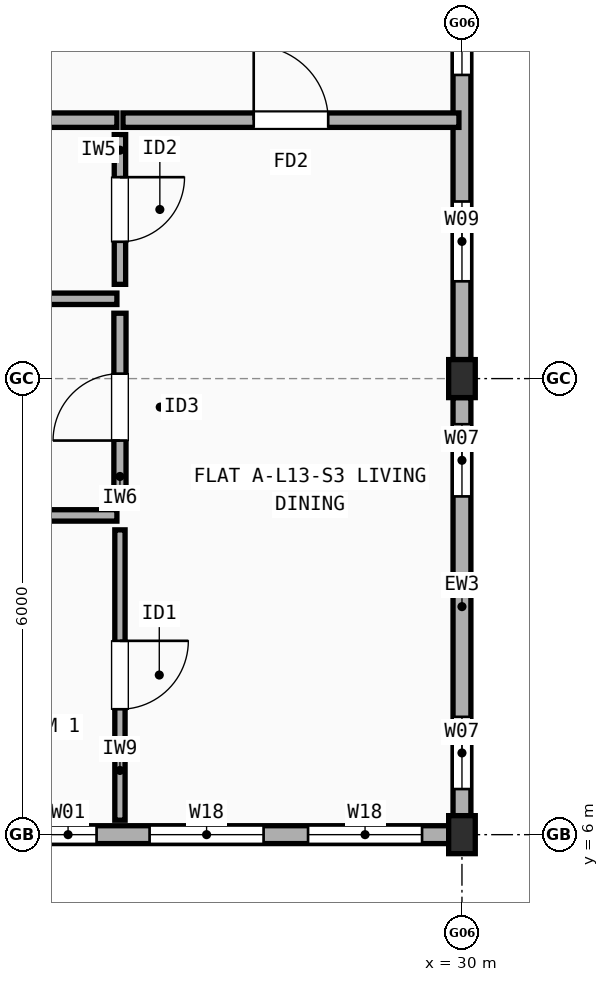
"""IFC4 building model, lengths in metres.
Left out: names, types, materials, properties, quantities, classifications, styles, units other than length and angle.
Written with IfcOpenShell. Run it as: python <this file> out.ifc"""

import sys

from ifc_helpers import new_model, si_unit, direction, frame, frame_2d, origin, origin_2d, place, context, subcontext, project, spatial, rectangle, extrude, element, fill, save


model = new_model("IFC4")
c1 = context("Model", 3, precision=1e-05, world=origin(), true_north=direction((0.0, 1.0)))
c2 = subcontext(c1, "Body", "Model", "MODEL_VIEW")
j1 = project(units=[si_unit("LENGTHUNIT", "METRE"), si_unit("PLANEANGLEUNIT", "RADIAN")], contexts=[c1])
p1 = place(None, origin())
s1 = spatial("IfcSite", under=j1, at=p1, CompositionType="ELEMENT")
p2 = place(p1, origin())
s2 = spatial("IfcBuilding", under=s1, at=p2, CompositionType="ELEMENT")
p3 = place(p2, frame((0.0, 0.0, 42.9)))
s3 = spatial("IfcBuildingStorey", under=s2, at=p3, CompositionType="ELEMENT", Elevation=42.9)
for number, where, z_axis, x_axis in (
    (1, (30.0, 6.0, 0.0), (0.0, 0.0, 1.0), (1.0, 0.0, 0.0)),
    (2, (30.0, 12.0, 0.0), (0.0, 0.0, 1.0), (1.0, 0.0, 0.0)),
):
    element("IfcColumn", number, at=place(p3, frame(where, z_axis=z_axis, x_axis=x_axis)), inside=s3, PredefinedType="COLUMN", context=c2, shape_type="SweptSolid", body=[
        extrude(rectangle(XDim=0.35, YDim=0.5, at=origin_2d()), origin(), (0.0, 0.0, 1.0), 3.005),
    ])
p4 = place(p3, frame((24.175, 6.0, 0.0), z_axis=(0.0, 0.0, 1.0), x_axis=(1.0, 0.0, 0.0)))
e3 = element("IfcWall", 3, at=p4, inside=s3, PredefinedType="STANDARD", context=c2, shape_type="SweptSolid", body=[
    extrude(rectangle(XDim=5.65, YDim=0.235, at=frame_2d((2.825, 0.0))), origin(), (0.0, 0.0, 1.0), 2.487),
])
p5 = place(p4, frame((0.268, 0.0, 0.9)))
e4 = element("IfcOpeningElement", 4, at=p5, cuts=e3, PredefinedType="OPENING", context=c2, shape_type="SweptSolid", body=[
    extrude(rectangle(XDim=0.75, YDim=1.15, at=frame_2d((0.375, 0.575))), frame((0.0, 0.127, 0.0), z_axis=(0.0, -1.0, 0.0), x_axis=(1.0, 0.0, 0.0)), (0.0, 0.0, 1.0), 0.255),
])
p6 = place(p4, frame((1.715, 0.0, 0.9)))
e5 = element("IfcOpeningElement", 5, at=p6, cuts=e3, PredefinedType="OPENING", context=c2, shape_type="SweptSolid", body=[
    extrude(rectangle(XDim=1.5, YDim=1.4, at=frame_2d((0.75, 0.7))), frame((0.0, 0.127, 0.0), z_axis=(0.0, -1.0, 0.0), x_axis=(1.0, 0.0, 0.0)), (0.0, 0.0, 1.0), 0.255),
])
p7 = place(p4, frame((3.8, 0.0, 0.9)))
e6 = element("IfcOpeningElement", 6, at=p7, cuts=e3, PredefinedType="OPENING", context=c2, shape_type="SweptSolid", body=[
    extrude(rectangle(XDim=1.5, YDim=1.4, at=frame_2d((0.75, 0.7))), frame((0.0, 0.127, 0.0), z_axis=(0.0, -1.0, 0.0), x_axis=(1.0, 0.0, 0.0)), (0.0, 0.0, 1.0), 0.255),
])
p8 = place(p3, frame((30.0, 6.25, 0.0), z_axis=(0.0, 0.0, 1.0), x_axis=(0.0, 1.0, 0.0)))
e7 = element("IfcWall", 7, at=p8, inside=s3, PredefinedType="STANDARD", context=c2, shape_type="SweptSolid", body=[
    extrude(rectangle(XDim=5.5, YDim=0.235, at=frame_2d((2.75, 0.0))), origin(), (0.0, 0.0, 1.0), 2.487),
])
p9 = place(p8, frame((0.35, 0.0, 0.9)))
e8 = element("IfcOpeningElement", 8, at=p9, cuts=e7, PredefinedType="OPENING", context=c2, shape_type="SweptSolid", body=[
    extrude(rectangle(XDim=0.95, YDim=1.35, at=frame_2d((0.475, 0.675))), frame((0.0, 0.127, 0.0), z_axis=(0.0, -1.0, 0.0), x_axis=(1.0, 0.0, 0.0)), (0.0, 0.0, 1.0), 0.255),
])
p10 = place(p8, frame((4.2, 0.0, 0.9)))
e9 = element("IfcOpeningElement", 9, at=p10, cuts=e7, PredefinedType="OPENING", context=c2, shape_type="SweptSolid", body=[
    extrude(rectangle(XDim=0.95, YDim=1.35, at=frame_2d((0.475, 0.675))), frame((0.0, 0.127, 0.0), z_axis=(0.0, -1.0, 0.0), x_axis=(1.0, 0.0, 0.0)), (0.0, 0.0, 1.0), 0.255),
])
p11 = place(p3, frame((30.0, 12.25, 0.0), z_axis=(0.0, 0.0, 1.0), x_axis=(0.0, 1.0, 0.0)))
e10 = element("IfcWall", 10, at=p11, inside=s3, PredefinedType="STANDARD", context=c2, shape_type="SweptSolid", body=[
    extrude(rectangle(XDim=5.5, YDim=0.235, at=frame_2d((2.75, 0.0))), origin(), (0.0, 0.0, 1.0), 2.487),
])
p12 = place(p11, frame((1.03, 0.0, 0.9)))
e11 = element("IfcOpeningElement", 11, at=p12, cuts=e10, PredefinedType="OPENING", context=c2, shape_type="SweptSolid", body=[
    extrude(rectangle(XDim=1.05, YDim=1.35, at=frame_2d((0.525, 0.675))), frame((0.0, 0.127, 0.0), z_axis=(0.0, -1.0, 0.0), x_axis=(1.0, 0.0, 0.0)), (0.0, 0.0, 1.0), 0.255),
])
p13 = place(p11, frame((3.745, 0.0, 0.9)))
e12 = element("IfcOpeningElement", 12, at=p13, cuts=e10, PredefinedType="OPENING", context=c2, shape_type="SweptSolid", body=[
    extrude(rectangle(XDim=1.2, YDim=1.35, at=frame_2d((0.6, 0.675))), frame((0.0, 0.127, 0.0), z_axis=(0.0, -1.0, 0.0), x_axis=(1.0, 0.0, 0.0)), (0.0, 0.0, 1.0), 0.255),
])
p14 = place(p3, frame((22.54, 15.4, 0.0), z_axis=(0.0, 0.0, 1.0), x_axis=(1.0, 0.0, 0.0)))
e13 = element("IfcWall", 13, at=p14, inside=s3, PredefinedType="SOLIDWALL", context=c2, shape_type="SweptSolid", body=[
    extrude(rectangle(XDim=2.92, YDim=0.19, at=frame_2d((1.46, 0.0))), origin(), (0.0, 0.0, 1.0), 2.548),
])
p15 = place(p3, frame((25.54, 15.4, 0.0), z_axis=(0.0, 0.0, 1.0), x_axis=(1.0, 0.0, 0.0)))
e14 = element("IfcWall", 14, at=p15, inside=s3, PredefinedType="SOLIDWALL", context=c2, shape_type="SweptSolid", body=[
    extrude(rectangle(XDim=4.42, YDim=0.19, at=frame_2d((2.21, 0.0))), origin(), (0.0, 0.0, 1.0), 2.487),
])
p16 = place(p15, frame((1.72, 0.0, 0.0)))
e15 = element("IfcOpeningElement", 15, at=p16, cuts=e14, PredefinedType="OPENING", context=c2, shape_type="SweptSolid", body=[
    extrude(rectangle(XDim=0.98, YDim=2.15, at=frame_2d((0.49, 1.075))), frame((0.0, 0.105, 0.0), z_axis=(0.0, -1.0, 0.0), x_axis=(1.0, 0.0, 0.0)), (0.0, 0.0, 1.0), 0.21),
])
p17 = place(p3, frame((25.5, 6.19, 0.0), z_axis=(0.0, 0.0, 1.0), x_axis=(0.0, 1.0, 0.0)))
e16 = element("IfcWall", 16, at=p17, inside=s3, PredefinedType="PARTITIONING", context=c2, shape_type="SweptSolid", body=[
    extrude(rectangle(XDim=3.82, YDim=0.135, at=frame_2d((1.91, 0.0))), origin(), (0.0, 0.0, 1.0), 3.005),
])
p18 = place(p17, frame((1.46, 0.0, 0.0)))
e17 = element("IfcOpeningElement", 17, at=p18, cuts=e16, PredefinedType="OPENING", context=c2, shape_type="SweptSolid", body=[
    extrude(rectangle(XDim=0.9, YDim=2.1, at=frame_2d((0.45, 1.05))), frame((0.0, 0.077, 0.0), z_axis=(0.0, -1.0, 0.0), x_axis=(1.0, 0.0, 0.0)), (0.0, 0.0, 1.0), 0.155),
])
p19 = place(p3, frame((25.5, 10.39, 0.0), z_axis=(0.0, 0.0, 1.0), x_axis=(0.0, 1.0, 0.0)))
e18 = element("IfcWall", 18, at=p19, inside=s3, PredefinedType="PLUMBINGWALL", context=c2, shape_type="SweptSolid", body=[
    extrude(rectangle(XDim=2.47, YDim=0.16, at=frame_2d((1.235, 0.0))), origin(), (0.0, 0.0, 1.0), 2.537),
])
p20 = place(p19, frame((0.795, 0.0, 0.0)))
e19 = element("IfcOpeningElement", 19, at=p20, cuts=e18, PredefinedType="OPENING", context=c2, shape_type="SweptSolid", body=[
    extrude(rectangle(XDim=0.88, YDim=2.1, at=frame_2d((0.44, 1.05))), frame((0.0, 0.09, 0.0), z_axis=(0.0, -1.0, 0.0), x_axis=(1.0, 0.0, 0.0)), (0.0, 0.0, 1.0), 0.18),
])
p21 = place(p3, frame((25.5, 13.24, 0.0), z_axis=(0.0, 0.0, 1.0), x_axis=(0.0, 1.0, 0.0)))
e20 = element("IfcWall", 20, at=p21, inside=s3, PredefinedType="PARTITIONING", context=c2, shape_type="SweptSolid", body=[
    extrude(rectangle(XDim=1.97, YDim=0.15, at=frame_2d((0.985, 0.0))), origin(), (0.0, 0.0, 1.0), 3.005),
])
p22 = place(p21, frame((0.56, 0.0, 0.0)))
e21 = element("IfcOpeningElement", 21, at=p22, cuts=e20, PredefinedType="OPENING", context=c2, shape_type="SweptSolid", body=[
    extrude(rectangle(XDim=0.85, YDim=2.1, at=frame_2d((0.425, 1.05))), frame((0.0, 0.085, 0.0), z_axis=(0.0, -1.0, 0.0), x_axis=(1.0, 0.0, 0.0)), (0.0, 0.0, 1.0), 0.17),
])
p23 = place(p3, frame((22.54, 10.2, 0.0), z_axis=(0.0, 0.0, 1.0), x_axis=(1.0, 0.0, 0.0)))
e22 = element("IfcWall", 22, at=p23, inside=s3, PredefinedType="PARTITIONING", context=c2, shape_type="SweptSolid", body=[
    extrude(rectangle(XDim=2.92, YDim=0.15, at=frame_2d((1.46, 0.0))), origin(), (0.0, 0.0, 1.0), 2.458),
])
p24 = place(p3, frame((22.54, 13.05, 0.0), z_axis=(0.0, 0.0, 1.0), x_axis=(1.0, 0.0, 0.0)))
e23 = element("IfcWall", 23, at=p24, inside=s3, PredefinedType="PARTITIONING", context=c2, shape_type="SweptSolid", body=[
    extrude(rectangle(XDim=2.92, YDim=0.15, at=frame_2d((1.46, 0.0))), origin(), (0.0, 0.0, 1.0), 2.548),
])
p25 = place(p5, origin())
e24 = element("IfcWindow", 24, at=p25, inside=s3, PartitioningType="SINGLE_PANEL", PredefinedType="WINDOW", context=c2, shape_type="SweptSolid", body=[
    extrude(rectangle(XDim=0.75, YDim=1.15, at=frame_2d((0.375, 0.575))), frame((0.0, 0.03, 0.0), z_axis=(0.0, -1.0, 0.0), x_axis=(1.0, 0.0, 0.0)), (0.0, 0.0, 1.0), 0.06),
])
fill(e4, e24)
p26 = place(p6, origin())
e25 = element("IfcWindow", 25, at=p26, inside=s3, PartitioningType="SINGLE_PANEL", PredefinedType="WINDOW", context=c2, shape_type="SweptSolid", body=[
    extrude(rectangle(XDim=1.5, YDim=1.4, at=frame_2d((0.75, 0.7))), frame((0.0, 0.03, 0.0), z_axis=(0.0, -1.0, 0.0), x_axis=(1.0, 0.0, 0.0)), (0.0, 0.0, 1.0), 0.06),
])
fill(e5, e25)
p27 = place(p7, origin())
e26 = element("IfcWindow", 26, at=p27, inside=s3, PartitioningType="SINGLE_PANEL", PredefinedType="WINDOW", context=c2, shape_type="SweptSolid", body=[
    extrude(rectangle(XDim=1.5, YDim=1.4, at=frame_2d((0.75, 0.7))), frame((0.0, 0.03, 0.0), z_axis=(0.0, -1.0, 0.0), x_axis=(1.0, 0.0, 0.0)), (0.0, 0.0, 1.0), 0.06),
])
fill(e6, e26)
p28 = place(p9, origin())
e27 = element("IfcWindow", 27, at=p28, inside=s3, PartitioningType="SINGLE_PANEL", PredefinedType="WINDOW", context=c2, shape_type="SweptSolid", body=[
    extrude(rectangle(XDim=0.95, YDim=1.35, at=frame_2d((0.475, 0.675))), frame((0.0, 0.03, 0.0), z_axis=(0.0, -1.0, 0.0), x_axis=(1.0, 0.0, 0.0)), (0.0, 0.0, 1.0), 0.06),
])
fill(e8, e27)
p29 = place(p10, origin())
e28 = element("IfcWindow", 28, at=p29, inside=s3, PartitioningType="SINGLE_PANEL", PredefinedType="WINDOW", context=c2, shape_type="SweptSolid", body=[
    extrude(rectangle(XDim=0.95, YDim=1.35, at=frame_2d((0.475, 0.675))), frame((0.0, 0.03, 0.0), z_axis=(0.0, -1.0, 0.0), x_axis=(1.0, 0.0, 0.0)), (0.0, 0.0, 1.0), 0.06),
])
fill(e9, e28)
p30 = place(p12, origin())
e29 = element("IfcWindow", 29, at=p30, inside=s3, PartitioningType="SINGLE_PANEL", PredefinedType="WINDOW", context=c2, shape_type="SweptSolid", body=[
    extrude(rectangle(XDim=1.05, YDim=1.35, at=frame_2d((0.525, 0.675))), frame((0.0, 0.03, 0.0), z_axis=(0.0, -1.0, 0.0), x_axis=(1.0, 0.0, 0.0)), (0.0, 0.0, 1.0), 0.06),
])
fill(e11, e29)
p31 = place(p13, origin())
e30 = element("IfcWindow", 30, at=p31, inside=s3, PartitioningType="SINGLE_PANEL", PredefinedType="WINDOW", context=c2, shape_type="SweptSolid", body=[
    extrude(rectangle(XDim=1.2, YDim=1.35, at=frame_2d((0.6, 0.675))), frame((0.0, 0.03, 0.0), z_axis=(0.0, -1.0, 0.0), x_axis=(1.0, 0.0, 0.0)), (0.0, 0.0, 1.0), 0.06),
])
fill(e12, e30)
p32 = place(p16, origin())
e31 = element("IfcDoor", 31, at=p32, inside=s3, OperationType="SINGLE_SWING_LEFT", PredefinedType="DOOR", context=c2, shape_type="SweptSolid", body=[
    extrude(rectangle(XDim=0.98, YDim=2.15, at=frame_2d((0.49, 1.075))), frame((0.0, 0.025, 0.0), z_axis=(0.0, -1.0, 0.0), x_axis=(1.0, 0.0, 0.0)), (0.0, 0.0, 1.0), 0.05),
])
fill(e15, e31)
p33 = place(p18, origin())
e32 = element("IfcDoor", 32, at=p33, inside=s3, OperationType="SINGLE_SWING_RIGHT", PredefinedType="DOOR", context=c2, shape_type="SweptSolid", body=[
    extrude(rectangle(XDim=0.9, YDim=2.1, at=frame_2d((0.45, 1.05))), frame((0.0, 0.025, 0.0), z_axis=(0.0, -1.0, 0.0), x_axis=(1.0, 0.0, 0.0)), (0.0, 0.0, 1.0), 0.05),
])
fill(e17, e32)
p34 = place(p20, origin())
e33 = element("IfcDoor", 33, at=p34, inside=s3, OperationType="SINGLE_SWING_LEFT", PredefinedType="DOOR", context=c2, shape_type="SweptSolid", body=[
    extrude(rectangle(XDim=0.88, YDim=2.1, at=frame_2d((0.44, 1.05))), frame((0.0, 0.025, 0.0), z_axis=(0.0, -1.0, 0.0), x_axis=(1.0, 0.0, 0.0)), (0.0, 0.0, 1.0), 0.05),
])
fill(e19, e33)
p35 = place(p22, origin())
e34 = element("IfcDoor", 34, at=p35, inside=s3, OperationType="SINGLE_SWING_RIGHT", PredefinedType="DOOR", context=c2, shape_type="SweptSolid", body=[
    extrude(rectangle(XDim=0.85, YDim=2.1, at=frame_2d((0.425, 1.05))), frame((0.0, 0.025, 0.0), z_axis=(0.0, -1.0, 0.0), x_axis=(1.0, 0.0, 0.0)), (0.0, 0.0, 1.0), 0.05),
])
fill(e21, e34)
save(model, sys.argv[1])
